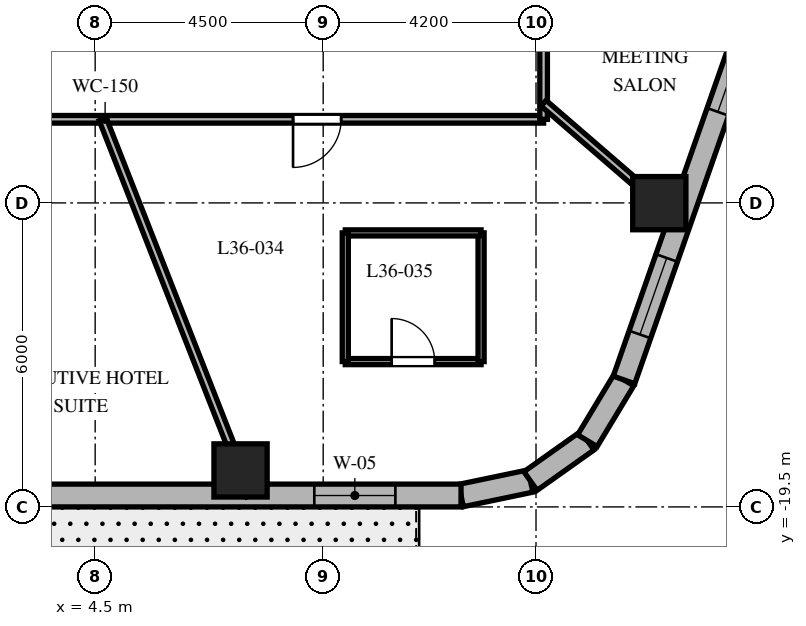
"""IFC4 building model, lengths in metres.
Left out: names, types, materials, properties, quantities, classifications, styles, units other than length and angle.
Written with IfcOpenShell. Run it as: python <this file> out.ifc"""

import sys

from ifc_helpers import new_model, si_unit, direction, frame, frame_2d, origin, origin_2d, place, context, subcontext, project, spatial, rectangle, extrude, element, fill, save


model = new_model("IFC4")
c1 = context("Model", 3, precision=1e-05, world=origin(), true_north=direction((0.0, 1.0)))
c2 = subcontext(c1, "Body", "Model", "MODEL_VIEW")
j1 = project(units=[si_unit("LENGTHUNIT", "METRE"), si_unit("PLANEANGLEUNIT", "RADIAN")], contexts=[c1])
p1 = place(None, origin())
s1 = spatial("IfcSite", under=j1, at=p1, CompositionType="ELEMENT")
p2 = place(p1, origin())
s2 = spatial("IfcBuilding", under=s1, at=p2, CompositionType="ELEMENT")
p3 = place(p2, frame((0.0, 0.0, 148.0)))
s3 = spatial("IfcBuildingStorey", under=s2, at=p3, CompositionType="ELEMENT", Elevation=148.0)
for number, where, z_axis, x_axis in (
    (1, (7.369, -18.78, 0.0), (0.0, 0.0, 1.0), (1.0, 0.0, 0.0)),
    (2, (15.633, -13.505, 0.0), (0.0, 0.0, 1.0), (1.0, 0.0, 0.0)),
):
    element("IfcColumn", number, at=place(p3, frame(where, z_axis=z_axis, x_axis=x_axis)), inside=s3, PredefinedType="COLUMN", context=c2, shape_type="SweptSolid", body=[
        extrude(rectangle(XDim=1.05, YDim=1.05, at=origin_2d()), origin(), (0.0, 0.0, 1.0), 3.7),
    ])
p4 = place(p3, frame((11.72, -19.275, 0.0), z_axis=(0.0, 0.0, 1.0), x_axis=(0.97893106758, 0.204191001093, 0.0)))
e3 = element("IfcWall", 3, at=p4, inside=s3, PredefinedType="SOLIDWALL", context=c2, shape_type="SweptSolid", body=[
    extrude(rectangle(XDim=1.4, YDim=0.45, at=frame_2d((0.7, 0.0))), origin(), (0.0, 0.0, 1.0), 3.4),
])
p5 = place(p3, frame((13.091, -18.989, 0.0), z_axis=(0.0, 0.0, 1.0), x_axis=(0.815574637848, 0.578651890258, 0.0)))
e4 = element("IfcWall", 4, at=p5, inside=s3, PredefinedType="SOLIDWALL", context=c2, shape_type="SweptSolid", body=[
    extrude(rectangle(XDim=1.377, YDim=0.45, at=frame_2d((0.688, 0.0))), origin(), (0.0, 0.0, 1.0), 3.4),
])
p6 = place(p3, frame((14.214, -18.192, 0.0), z_axis=(0.0, 0.0, 1.0), x_axis=(0.516340945502, 0.856383108193, 0.0)))
e5 = element("IfcWall", 5, at=p6, inside=s3, PredefinedType="SOLIDWALL", context=c2, shape_type="SweptSolid", body=[
    extrude(rectangle(XDim=1.4, YDim=0.45, at=frame_2d((0.7, 0.0))), origin(), (0.0, 0.0, 1.0), 3.4),
])
p7 = place(p3, frame((-10.108, -19.275, 0.0), z_axis=(0.0, 0.0, 1.0), x_axis=(1.0, 0.0, 0.0)))
e6 = element("IfcWall", 6, at=p7, inside=s3, PredefinedType="SOLIDWALL", context=c2, shape_type="SweptSolid", body=[
    extrude(rectangle(XDim=21.829, YDim=0.45, at=frame_2d((10.915, 0.0))), origin(), (0.0, 0.0, 1.0), 3.4),
])
p8 = place(p7, frame((5.503, 0.0, 0.0)))
e7 = element("IfcOpeningElement", 7, at=p8, cuts=e6, PredefinedType="OPENING", context=c2, shape_type="SweptSolid", body=[
    extrude(rectangle(XDim=1.0, YDim=2.15, at=frame_2d((0.5, 1.075))), frame((0.0, 0.235, 0.0), z_axis=(0.0, -1.0, 0.0), x_axis=(1.0, 0.0, 0.0)), (0.0, 0.0, 1.0), 0.47),
])
p9 = place(p7, frame((1.297, 0.0, 0.8)))
e8 = element("IfcOpeningElement", 8, at=p9, cuts=e6, PredefinedType="OPENING", context=c2, shape_type="SweptSolid", body=[
    extrude(rectangle(XDim=1.6, YDim=1.75, at=frame_2d((0.8, 0.875))), frame((0.0, 0.235, 0.0), z_axis=(0.0, -1.0, 0.0), x_axis=(1.0, 0.0, 0.0)), (0.0, 0.0, 1.0), 0.47),
])
p10 = place(p7, frame((10.115, 0.0, 0.8)))
e9 = element("IfcOpeningElement", 9, at=p10, cuts=e6, PredefinedType="OPENING", context=c2, shape_type="SweptSolid", body=[
    extrude(rectangle(XDim=1.6, YDim=1.75, at=frame_2d((0.8, 0.875))), frame((0.0, 0.235, 0.0), z_axis=(0.0, -1.0, 0.0), x_axis=(1.0, 0.0, 0.0)), (0.0, 0.0, 1.0), 0.47),
])
p11 = place(p7, frame((18.933, 0.0, 0.8)))
e10 = element("IfcOpeningElement", 10, at=p11, cuts=e6, PredefinedType="OPENING", context=c2, shape_type="SweptSolid", body=[
    extrude(rectangle(XDim=1.6, YDim=1.75, at=frame_2d((0.8, 0.875))), frame((0.0, 0.235, 0.0), z_axis=(0.0, -1.0, 0.0), x_axis=(1.0, 0.0, 0.0)), (0.0, 0.0, 1.0), 0.47),
])
p12 = place(p3, frame((14.937, -16.993, 0.0), z_axis=(0.0, 0.0, 1.0), x_axis=(0.330431575061, 0.943829949834, 0.0)))
e11 = element("IfcWall", 11, at=p12, inside=s3, PredefinedType="SOLIDWALL", context=c2, shape_type="SweptSolid", body=[
    extrude(rectangle(XDim=17.689, YDim=0.45, at=frame_2d((8.844, 0.0))), origin(), (0.0, 0.0, 1.0), 3.4),
])
p13 = place(p12, frame((0.95, 0.0, 0.8)))
e12 = element("IfcOpeningElement", 12, at=p13, cuts=e11, PredefinedType="OPENING", context=c2, shape_type="SweptSolid", body=[
    extrude(rectangle(XDim=1.6, YDim=1.75, at=frame_2d((0.8, 0.875))), frame((0.0, 0.235, 0.0), z_axis=(0.0, -1.0, 0.0), x_axis=(1.0, 0.0, 0.0)), (0.0, 0.0, 1.0), 0.47),
])
p14 = place(p12, frame((5.605, 0.0, 0.8)))
e13 = element("IfcOpeningElement", 13, at=p14, cuts=e11, PredefinedType="OPENING", context=c2, shape_type="SweptSolid", body=[
    extrude(rectangle(XDim=1.6, YDim=1.75, at=frame_2d((0.8, 0.875))), frame((0.0, 0.235, 0.0), z_axis=(0.0, -1.0, 0.0), x_axis=(1.0, 0.0, 0.0)), (0.0, 0.0, 1.0), 0.47),
])
p15 = place(p12, frame((10.531, 0.0, 0.8)))
e14 = element("IfcOpeningElement", 14, at=p15, cuts=e11, PredefinedType="OPENING", context=c2, shape_type="SweptSolid", body=[
    extrude(rectangle(XDim=1.6, YDim=1.75, at=frame_2d((0.8, 0.875))), frame((0.0, 0.235, 0.0), z_axis=(0.0, -1.0, 0.0), x_axis=(1.0, 0.0, 0.0)), (0.0, 0.0, 1.0), 0.47),
])
p16 = place(p12, frame((15.084, 0.0, 0.8)))
e15 = element("IfcOpeningElement", 15, at=p16, cuts=e11, PredefinedType="OPENING", context=c2, shape_type="SweptSolid", body=[
    extrude(rectangle(XDim=1.6, YDim=1.75, at=frame_2d((0.8, 0.875))), frame((0.0, 0.235, 0.0), z_axis=(0.0, -1.0, 0.0), x_axis=(1.0, 0.0, 0.0)), (0.0, 0.0, 1.0), 0.47),
])
p17 = place(p3, frame((13.35, -11.85, 0.0), z_axis=(0.0, 0.0, 1.0), x_axis=(-1.0, 0.0, 0.0)))
e16 = element("IfcWall", 16, at=p17, inside=s3, PredefinedType="PARTITIONING", context=c2, shape_type="SweptSolid", body=[
    extrude(rectangle(XDim=26.7, YDim=0.15, at=frame_2d((13.35, 0.0))), origin(), (0.0, 0.0, 1.0), 2.84),
])
p18 = place(p17, frame((20.682, 0.0, 0.0)))
e17 = element("IfcOpeningElement", 17, at=p18, cuts=e16, PredefinedType="OPENING", context=c2, shape_type="SweptSolid", body=[
    extrude(rectangle(XDim=0.95, YDim=2.03, at=frame_2d((0.475, 1.015))), frame((0.0, 0.085, 0.0), z_axis=(0.0, -1.0, 0.0), x_axis=(1.0, 0.0, 0.0)), (0.0, 0.0, 1.0), 0.17),
])
p19 = place(p17, frame((12.362, 0.0, 0.0)))
e18 = element("IfcOpeningElement", 18, at=p19, cuts=e16, PredefinedType="OPENING", context=c2, shape_type="SweptSolid", body=[
    extrude(rectangle(XDim=0.95, YDim=2.03, at=frame_2d((0.475, 1.015))), frame((0.0, 0.085, 0.0), z_axis=(0.0, -1.0, 0.0), x_axis=(1.0, 0.0, 0.0)), (0.0, 0.0, 1.0), 0.17),
])
p20 = place(p17, frame((3.995, 0.0, 0.0)))
e19 = element("IfcOpeningElement", 19, at=p20, cuts=e16, PredefinedType="OPENING", context=c2, shape_type="SweptSolid", body=[
    extrude(rectangle(XDim=0.95, YDim=2.03, at=frame_2d((0.475, 1.015))), frame((0.0, 0.085, 0.0), z_axis=(0.0, -1.0, 0.0), x_axis=(1.0, 0.0, 0.0)), (0.0, 0.0, 1.0), 0.17),
])
p21 = place(p3, frame((13.35, 11.85, 0.0), z_axis=(0.0, 0.0, 1.0), x_axis=(0.0, -1.0, 0.0)))
e20 = element("IfcWall", 20, at=p21, inside=s3, PredefinedType="PARTITIONING", context=c2, shape_type="SweptSolid", body=[
    extrude(rectangle(XDim=23.7, YDim=0.15, at=frame_2d((11.85, 0.0))), origin(), (0.0, 0.0, 1.0), 2.84),
])
p22 = place(p21, frame((3.765, 0.0, 0.0)))
e21 = element("IfcOpeningElement", 21, at=p22, cuts=e20, PredefinedType="OPENING", context=c2, shape_type="SweptSolid", body=[
    extrude(rectangle(XDim=0.9, YDim=2.03, at=frame_2d((0.45, 1.015))), frame((0.0, 0.085, 0.0), z_axis=(0.0, -1.0, 0.0), x_axis=(1.0, 0.0, 0.0)), (0.0, 0.0, 1.0), 0.17),
])
p23 = place(p21, frame((20.395, 0.0, 0.0)))
e22 = element("IfcOpeningElement", 22, at=p23, cuts=e20, PredefinedType="OPENING", context=c2, shape_type="SweptSolid", body=[
    extrude(rectangle(XDim=0.9, YDim=2.03, at=frame_2d((0.45, 1.015))), frame((0.0, 0.085, 0.0), z_axis=(0.0, -1.0, 0.0), x_axis=(1.0, 0.0, 0.0)), (0.0, 0.0, 1.0), 0.17),
])
p24 = place(p21, frame((15.787, 0.0, 0.0)))
e23 = element("IfcOpeningElement", 23, at=p24, cuts=e20, PredefinedType="OPENING", context=c2, shape_type="SweptSolid", body=[
    extrude(rectangle(XDim=0.95, YDim=2.03, at=frame_2d((0.475, 1.015))), frame((0.0, 0.085, 0.0), z_axis=(0.0, -1.0, 0.0), x_axis=(1.0, 0.0, 0.0)), (0.0, 0.0, 1.0), 0.17),
])
p25 = place(p21, frame((10.751, 0.0, 0.0)))
e24 = element("IfcOpeningElement", 24, at=p25, cuts=e20, PredefinedType="OPENING", context=c2, shape_type="SweptSolid", body=[
    extrude(rectangle(XDim=0.95, YDim=2.03, at=frame_2d((0.475, 1.015))), frame((0.0, 0.085, 0.0), z_axis=(0.0, -1.0, 0.0), x_axis=(1.0, 0.0, 0.0)), (0.0, 0.0, 1.0), 0.17),
])
p26 = place(p3, frame((4.65, -11.85, 0.0), z_axis=(0.0, 0.0, 1.0), x_axis=(0.365265947993, -0.930903210456, 0.0)))
e25 = element("IfcWall", 25, at=p26, inside=s3, PredefinedType="PARTITIONING", context=c2, shape_type="SweptSolid", body=[
    extrude(rectangle(XDim=7.976, YDim=0.15, at=frame_2d((3.988, 0.0))), origin(), (0.0, 0.0, 1.0), 2.64),
])
p27 = place(p3, frame((13.35, -11.533, 0.0), z_axis=(0.0, 0.0, 1.0), x_axis=(0.756711647314, -0.65374879183, 0.0)))
e26 = element("IfcWall", 26, at=p27, inside=s3, PredefinedType="PARTITIONING", context=c2, shape_type="SweptSolid", body=[
    extrude(rectangle(XDim=3.55, YDim=0.15, at=frame_2d((1.775, 0.0))), origin(), (0.0, 0.0, 1.0), 2.64),
])
p28 = place(p3, frame((9.436, -16.632, 0.0), z_axis=(0.0, 0.0, 1.0), x_axis=(1.0, 0.0, 0.0)))
e27 = element("IfcWall", 27, at=p28, inside=s3, PredefinedType="PARTITIONING", context=c2, shape_type="SweptSolid", body=[
    extrude(rectangle(XDim=2.68, YDim=0.12, at=frame_2d((1.34, 0.0))), origin(), (0.0, 0.0, 1.0), 2.64),
])
p29 = place(p28, frame((0.915, 0.0, 0.0)))
e28 = element("IfcOpeningElement", 28, at=p29, cuts=e27, PredefinedType="OPENING", context=c2, shape_type="SweptSolid", body=[
    extrude(rectangle(XDim=0.85, YDim=2.03, at=frame_2d((0.425, 1.015))), frame((0.0, 0.07, 0.0), z_axis=(0.0, -1.0, 0.0), x_axis=(1.0, 0.0, 0.0)), (0.0, 0.0, 1.0), 0.14),
])
p30 = place(p3, frame((12.116, -16.632, 0.0), z_axis=(0.0, 0.0, 1.0), x_axis=(0.0, 1.0, 0.0)))
e29 = element("IfcWall", 29, at=p30, inside=s3, PredefinedType="PARTITIONING", context=c2, shape_type="SweptSolid", body=[
    extrude(rectangle(XDim=2.54, YDim=0.12, at=frame_2d((1.27, 0.0))), origin(), (0.0, 0.0, 1.0), 2.64),
])
p31 = place(p3, frame((12.116, -14.092, 0.0), z_axis=(0.0, 0.0, 1.0), x_axis=(-1.0, 0.0, 0.0)))
e30 = element("IfcWall", 30, at=p31, inside=s3, PredefinedType="PARTITIONING", context=c2, shape_type="SweptSolid", body=[
    extrude(rectangle(XDim=2.68, YDim=0.12, at=frame_2d((1.34, 0.0))), origin(), (0.0, 0.0, 1.0), 2.927),
])
p32 = place(p3, frame((9.436, -14.092, 0.0), z_axis=(0.0, 0.0, 1.0), x_axis=(0.0, -1.0, 0.0)))
e31 = element("IfcWall", 31, at=p32, inside=s3, PredefinedType="PARTITIONING", context=c2, shape_type="SweptSolid", body=[
    extrude(rectangle(XDim=2.54, YDim=0.12, at=frame_2d((1.27, 0.0))), origin(), (0.0, 0.0, 1.0), 2.927),
])
p33 = place(p11, origin())
e32 = element("IfcWindow", 32, at=p33, inside=s3, PartitioningType="SINGLE_PANEL", PredefinedType="WINDOW", context=c2, shape_type="SweptSolid", body=[
    extrude(rectangle(XDim=1.6, YDim=1.75, at=frame_2d((0.8, 0.875))), frame((0.0, 0.03, 0.0), z_axis=(0.0, -1.0, 0.0), x_axis=(1.0, 0.0, 0.0)), (0.0, 0.0, 1.0), 0.06),
])
fill(e10, e32)
p34 = place(p13, origin())
e33 = element("IfcWindow", 33, at=p34, inside=s3, PartitioningType="SINGLE_PANEL", PredefinedType="WINDOW", context=c2, shape_type="SweptSolid", body=[
    extrude(rectangle(XDim=1.6, YDim=1.75, at=frame_2d((0.8, 0.875))), frame((0.0, 0.03, 0.0), z_axis=(0.0, -1.0, 0.0), x_axis=(1.0, 0.0, 0.0)), (0.0, 0.0, 1.0), 0.06),
])
fill(e12, e33)
p35 = place(p14, origin())
e34 = element("IfcWindow", 34, at=p35, inside=s3, PartitioningType="SINGLE_PANEL", PredefinedType="WINDOW", context=c2, shape_type="SweptSolid", body=[
    extrude(rectangle(XDim=1.6, YDim=1.75, at=frame_2d((0.8, 0.875))), frame((0.0, 0.03, 0.0), z_axis=(0.0, -1.0, 0.0), x_axis=(1.0, 0.0, 0.0)), (0.0, 0.0, 1.0), 0.06),
])
fill(e13, e34)
p36 = place(p20, origin())
e35 = element("IfcDoor", 35, at=p36, inside=s3, OperationType="SINGLE_SWING_RIGHT", PredefinedType="DOOR", context=c2, shape_type="SweptSolid", body=[
    extrude(rectangle(XDim=0.95, YDim=2.03, at=frame_2d((0.475, 1.015))), frame((0.0, 0.025, 0.0), z_axis=(0.0, -1.0, 0.0), x_axis=(1.0, 0.0, 0.0)), (0.0, 0.0, 1.0), 0.05),
])
fill(e19, e35)
p37 = place(p29, origin())
e36 = element("IfcDoor", 36, at=p37, inside=s3, OperationType="SINGLE_SWING_LEFT", PredefinedType="DOOR", context=c2, shape_type="SweptSolid", body=[
    extrude(rectangle(XDim=0.85, YDim=2.03, at=frame_2d((0.425, 1.015))), frame((0.0, 0.025, 0.0), z_axis=(0.0, -1.0, 0.0), x_axis=(1.0, 0.0, 0.0)), (0.0, 0.0, 1.0), 0.05),
])
fill(e28, e36)
save(model, sys.argv[1])
